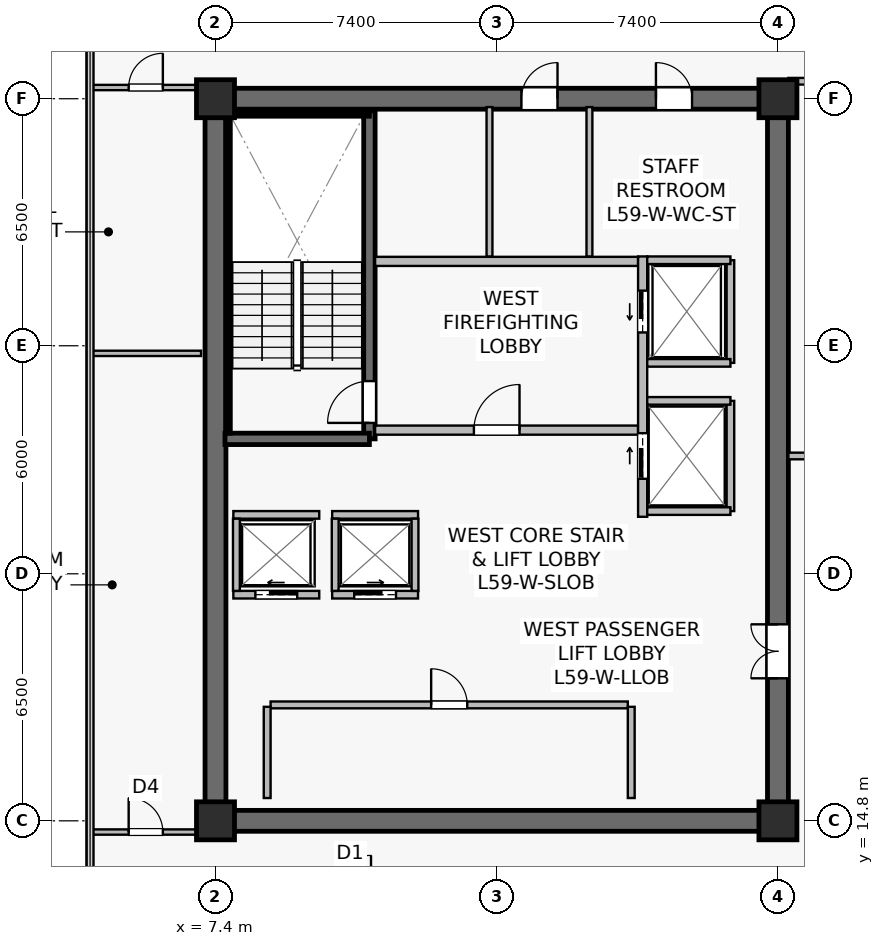
"""IFC4 building model, lengths in metres.
Left out: names, types, materials, properties, quantities, classifications, styles, units other than length and angle.
Written with IfcOpenShell. Run it as: python <this file> out.ifc"""

import sys

from ifc_helpers import new_model, si_unit, direction, frame, frame_2d, origin, origin_2d, place, context, subcontext, project, spatial, rectangle, extrude, source, transform, mapped, element, fill, save


model = new_model("IFC4")
c1 = context("Model", 3, precision=1e-05, world=origin(), true_north=direction((0.0, 1.0)))
c2 = subcontext(c1, "Body", "Model", "MODEL_VIEW")
j1 = project(units=[si_unit("LENGTHUNIT", "METRE"), si_unit("PLANEANGLEUNIT", "RADIAN")], contexts=[c1])
p1 = place(None, origin())
s1 = spatial("IfcSite", under=j1, at=p1, CompositionType="ELEMENT")
p2 = place(p1, origin())
s2 = spatial("IfcBuilding", under=s1, at=p2, CompositionType="ELEMENT")
p3 = place(p2, frame((0.0, 0.0, 246.5)))
s3 = spatial("IfcBuildingStorey", under=s2, at=p3, CompositionType="ELEMENT", Elevation=246.5)
p4 = place(p3, frame((7.125, 14.8, 0.0), z_axis=(0.0, 0.0, 1.0), x_axis=(1.0, 0.0, 0.0)))
e1 = element("IfcWall", 1, at=p4, inside=s3, PredefinedType="SHEAR", context=c2, shape_type="SweptSolid", body=[
    extrude(rectangle(XDim=15.35, YDim=0.55, at=frame_2d((7.675, 0.0))), origin(), (0.0, 0.0, 1.0), 3.8),
])
p5 = place(p3, frame((7.125, 33.8, 0.0), z_axis=(0.0, 0.0, 1.0), x_axis=(1.0, 0.0, 0.0)))
e2 = element("IfcWall", 2, at=p5, inside=s3, PredefinedType="SHEAR", context=c2, shape_type="SweptSolid", body=[
    extrude(rectangle(XDim=15.35, YDim=0.55, at=frame_2d((7.675, 0.0))), origin(), (0.0, 0.0, 1.0), 3.8),
])
p6 = place(p5, frame((8.325, 0.0, 0.0)))
e3 = element("IfcOpeningElement", 3, at=p6, cuts=e2, PredefinedType="OPENING", context=c2, shape_type="SweptSolid", body=[
    extrude(rectangle(XDim=0.95, YDim=2.15, at=frame_2d((0.475, 1.075))), frame((0.0, 0.285, 0.0), z_axis=(0.0, -1.0, 0.0), x_axis=(1.0, 0.0, 0.0)), (0.0, 0.0, 1.0), 0.57),
])
p7 = place(p5, frame((11.865, 0.0, 0.0)))
e4 = element("IfcOpeningElement", 4, at=p7, cuts=e2, PredefinedType="OPENING", context=c2, shape_type="SweptSolid", body=[
    extrude(rectangle(XDim=0.95, YDim=2.15, at=frame_2d((0.475, 1.075))), frame((0.0, 0.285, 0.0), z_axis=(0.0, -1.0, 0.0), x_axis=(1.0, 0.0, 0.0)), (0.0, 0.0, 1.0), 0.57),
])
p8 = place(p3, frame((7.4, 15.075, 0.0), z_axis=(0.0, 0.0, 1.0), x_axis=(0.0, 1.0, 0.0)))
e5 = element("IfcWall", 5, at=p8, inside=s3, PredefinedType="SHEAR", context=c2, shape_type="SweptSolid", body=[
    extrude(rectangle(XDim=18.45, YDim=0.55, at=frame_2d((9.225, 0.0))), origin(), (0.0, 0.0, 1.0), 3.8),
])
p9 = place(p3, frame((22.2, 15.075, 0.0), z_axis=(0.0, 0.0, 1.0), x_axis=(0.0, 1.0, 0.0)))
e6 = element("IfcWall", 6, at=p9, inside=s3, PredefinedType="SHEAR", context=c2, shape_type="SweptSolid", body=[
    extrude(rectangle(XDim=18.45, YDim=0.55, at=frame_2d((9.225, 0.0))), origin(), (0.0, 0.0, 1.0), 3.8),
])
p10 = place(p9, frame((3.475, 0.0, 0.0)))
e7 = element("IfcOpeningElement", 7, at=p10, cuts=e6, PredefinedType="OPENING", context=c2, shape_type="SweptSolid", body=[
    extrude(rectangle(XDim=1.42, YDim=2.2, at=frame_2d((0.71, 1.1))), frame((0.0, 0.285, 0.0), z_axis=(0.0, -1.0, 0.0), x_axis=(1.0, 0.0, 0.0)), (0.0, 0.0, 1.0), 0.57),
])
p11 = place(p3, frame((11.45, 24.85, 0.0), z_axis=(0.0, 0.0, 1.0), x_axis=(0.0, 1.0, 0.0)))
e8 = element("IfcWall", 8, at=p11, inside=s3, PredefinedType="SHEAR", context=c2, shape_type="SweptSolid", body=[
    extrude(rectangle(XDim=8.63, YDim=0.3, at=frame_2d((4.315, 0.0))), origin(), (0.0, 0.0, 1.0), 3.8),
])
p12 = place(p11, frame((0.42, 0.0, 0.0)))
e9 = element("IfcOpeningElement", 9, at=p12, cuts=e8, PredefinedType="OPENING", context=c2, shape_type="SweptSolid", body=[
    extrude(rectangle(XDim=1.1, YDim=2.15, at=frame_2d((0.55, 1.075))), frame((0.0, 0.16, 0.0), z_axis=(0.0, -1.0, 0.0), x_axis=(1.0, 0.0, 0.0)), (0.0, 0.0, 1.0), 0.32),
])
p13 = place(p3, frame((7.65, 24.85, 0.0), z_axis=(0.0, 0.0, 1.0), x_axis=(1.0, 0.0, 0.0)))
e10 = element("IfcWall", 10, at=p13, inside=s3, PredefinedType="SHEAR", context=c2, shape_type="SweptSolid", body=[
    extrude(rectangle(XDim=3.8, YDim=0.3, at=frame_2d((1.9, 0.0))), origin(), (0.0, 0.0, 1.0), 3.8),
])
p14 = place(p3, frame((7.73, 33.4, 0.0), z_axis=(0.0, 0.0, 1.0), x_axis=(1.0, 0.0, 0.0)))
e11 = element("IfcWall", 11, at=p14, inside=s3, PredefinedType="SOLIDWALL", context=c2, shape_type="SweptSolid", body=[
    extrude(rectangle(XDim=3.72, YDim=0.12, at=frame_2d((1.86, 0.0))), origin(), (0.0, 0.0, 1.0), 3.8),
])
p15 = place(p3, frame((7.73, 25.0, 0.0), z_axis=(0.0, 0.0, 1.0), x_axis=(0.0, 1.0, 0.0)))
e12 = element("IfcWall", 12, at=p15, inside=s3, PredefinedType="SOLIDWALL", context=c2, shape_type="SweptSolid", body=[
    extrude(rectangle(XDim=8.32, YDim=0.12, at=frame_2d((4.16, 0.0))), origin(), (0.0, 0.0, 1.0), 3.8),
])
m1 = source(origin(), c2, "Body", "SweptSolid", [
    extrude(rectangle(XDim=1.0, YDim=1.0, at=origin_2d()), origin(), (0.0, 0.0, 1.0), 4.1),
])
for number, where, z_axis, x_axis in (
    (13, (7.4, 14.8, 0.0), (0.0, 0.0, 1.0), (1.0, 0.0, 0.0)),
    (14, (22.2, 14.8, 0.0), (0.0, 0.0, 1.0), (1.0, 0.0, 0.0)),
    (15, (7.4, 33.8, 0.0), (0.0, 0.0, 1.0), (1.0, 0.0, 0.0)),
    (16, (22.2, 33.8, 0.0), (0.0, 0.0, 1.0), (1.0, 0.0, 0.0)),
):
    element("IfcColumn", number, at=place(p3, frame(where, z_axis=z_axis, x_axis=x_axis)), inside=s3, PredefinedType="COLUMN", context=c2, shape_type="MappedRepresentation", body=[
        mapped(m1, transform((0.0, 0.0, 0.0), scale=1.0)),
    ])
p16 = place(p3, frame((11.6, 25.08, 0.0), z_axis=(0.0, 0.0, 1.0), x_axis=(1.0, 0.0, 0.0)))
e17 = element("IfcWall", 17, at=p16, inside=s3, PredefinedType="SOLIDWALL", context=c2, shape_type="SweptSolid", body=[
    extrude(rectangle(XDim=6.92, YDim=0.24, at=frame_2d((3.46, 0.0))), origin(), (0.0, 0.0, 1.0), 3.197),
])
p17 = place(p16, frame((2.6, 0.0, 0.0)))
e18 = element("IfcOpeningElement", 18, at=p17, cuts=e17, PredefinedType="OPENING", context=c2, shape_type="SweptSolid", body=[
    extrude(rectangle(XDim=1.2, YDim=2.16, at=frame_2d((0.6, 1.08))), frame((0.0, 0.13, 0.0), z_axis=(0.0, -1.0, 0.0), x_axis=(1.0, 0.0, 0.0)), (0.0, 0.0, 1.0), 0.26),
])
p18 = place(p3, frame((11.6, 29.52, 0.0), z_axis=(0.0, 0.0, 1.0), x_axis=(1.0, 0.0, 0.0)))
e19 = element("IfcWall", 19, at=p18, inside=s3, PredefinedType="SOLIDWALL", context=c2, shape_type="SweptSolid", body=[
    extrude(rectangle(XDim=6.92, YDim=0.24, at=frame_2d((3.46, 0.0))), origin(), (0.0, 0.0, 1.0), 3.197),
])
p19 = place(p3, frame((18.64, 22.8, 0.0), z_axis=(0.0, 0.0, 1.0), x_axis=(0.0, 1.0, 0.0)))
e20 = element("IfcWall", 20, at=p19, inside=s3, PredefinedType="SOLIDWALL", context=c2, shape_type="SweptSolid", body=[
    extrude(rectangle(XDim=6.85, YDim=0.24, at=frame_2d((3.425, 0.0))), origin(), (0.0, 0.0, 1.0), 2.935),
])
p20 = place(p19, frame((4.85, 0.0, 0.0)))
e21 = element("IfcOpeningElement", 21, at=p20, cuts=e20, PredefinedType="OPENING", context=c2, shape_type="SweptSolid", body=[
    extrude(rectangle(XDim=1.1, YDim=2.22, at=frame_2d((0.55, 1.11))), frame((0.0, 0.13, 0.0), z_axis=(0.0, -1.0, 0.0), x_axis=(1.0, 0.0, 0.0)), (0.0, 0.0, 1.0), 0.26),
])
p21 = place(p19, frame((1.0, 0.0, 0.0)))
e22 = element("IfcOpeningElement", 22, at=p21, cuts=e20, PredefinedType="OPENING", context=c2, shape_type="SweptSolid", body=[
    extrude(rectangle(XDim=1.2, YDim=2.22, at=frame_2d((0.6, 1.11))), frame((0.0, 0.13, 0.0), z_axis=(0.0, -1.0, 0.0), x_axis=(1.0, 0.0, 0.0)), (0.0, 0.0, 1.0), 0.26),
])
p22 = place(p3, frame((7.87, 20.75, 0.0), z_axis=(0.0, 0.0, 1.0), x_axis=(1.0, 0.0, 0.0)))
e23 = element("IfcWall", 23, at=p22, inside=s3, PredefinedType="SOLIDWALL", context=c2, shape_type="SweptSolid", body=[
    extrude(rectangle(XDim=2.26, YDim=0.2, at=frame_2d((1.13, 0.0))), origin(), (0.0, 0.0, 1.0), 3.8),
])
p23 = place(p22, frame((0.58, 0.0, 0.0)))
e24 = element("IfcOpeningElement", 24, at=p23, cuts=e23, PredefinedType="OPENING", context=c2, shape_type="SweptSolid", body=[
    extrude(rectangle(XDim=1.1, YDim=2.22, at=frame_2d((0.55, 1.11))), frame((0.0, 0.11, 0.0), z_axis=(0.0, -1.0, 0.0), x_axis=(1.0, 0.0, 0.0)), (0.0, 0.0, 1.0), 0.22),
])
p24 = place(p3, frame((7.87, 22.85, 0.0), z_axis=(0.0, 0.0, 1.0), x_axis=(1.0, 0.0, 0.0)))
e25 = element("IfcWall", 25, at=p24, inside=s3, PredefinedType="SOLIDWALL", context=c2, shape_type="SweptSolid", body=[
    extrude(rectangle(XDim=2.26, YDim=0.2, at=frame_2d((1.13, 0.0))), origin(), (0.0, 0.0, 1.0), 3.8),
])
p25 = place(p3, frame((7.95, 20.85, 0.0), z_axis=(0.0, 0.0, 1.0), x_axis=(0.0, 1.0, 0.0)))
e26 = element("IfcWall", 26, at=p25, inside=s3, PredefinedType="SOLIDWALL", context=c2, shape_type="SweptSolid", body=[
    extrude(rectangle(XDim=1.9, YDim=0.18, at=frame_2d((0.95, 0.0))), origin(), (0.0, 0.0, 1.0), 3.8),
])
p26 = place(p3, frame((10.47, 20.75, 0.0), z_axis=(0.0, 0.0, 1.0), x_axis=(1.0, 0.0, 0.0)))
e27 = element("IfcWall", 27, at=p26, inside=s3, PredefinedType="SOLIDWALL", context=c2, shape_type="SweptSolid", body=[
    extrude(rectangle(XDim=2.26, YDim=0.2, at=frame_2d((1.13, 0.0))), origin(), (0.0, 0.0, 1.0), 3.8),
])
p27 = place(p26, frame((0.58, 0.0, 0.0)))
e28 = element("IfcOpeningElement", 28, at=p27, cuts=e27, PredefinedType="OPENING", context=c2, shape_type="SweptSolid", body=[
    extrude(rectangle(XDim=1.1, YDim=2.22, at=frame_2d((0.55, 1.11))), frame((0.0, 0.11, 0.0), z_axis=(0.0, -1.0, 0.0), x_axis=(1.0, 0.0, 0.0)), (0.0, 0.0, 1.0), 0.22),
])
p28 = place(p3, frame((10.47, 22.85, 0.0), z_axis=(0.0, 0.0, 1.0), x_axis=(1.0, 0.0, 0.0)))
e29 = element("IfcWall", 29, at=p28, inside=s3, PredefinedType="SOLIDWALL", context=c2, shape_type="SweptSolid", body=[
    extrude(rectangle(XDim=2.26, YDim=0.2, at=frame_2d((1.13, 0.0))), origin(), (0.0, 0.0, 1.0), 3.8),
])
for number, where, z_axis, x_axis in (
    (30, (10.55, 20.85, 0.0), (0.0, 0.0, 1.0), (0.0, 1.0, 0.0)),
    (31, (12.65, 20.85, 0.0), (0.0, 0.0, 1.0), (0.0, 1.0, 0.0)),
):
    element("IfcWall", number, at=place(p3, frame(where, z_axis=z_axis, x_axis=x_axis)), inside=s3, PredefinedType="SOLIDWALL", context=c2, shape_type="SweptSolid", body=[
        extrude(rectangle(XDim=1.9, YDim=0.18, at=frame_2d((0.95, 0.0))), origin(), (0.0, 0.0, 1.0), 3.8),
    ])
p29 = place(p3, frame((20.95, 26.85, 0.0), z_axis=(0.0, 0.0, 1.0), x_axis=(0.0, 1.0, 0.0)))
e32 = element("IfcWall", 32, at=p29, inside=s3, PredefinedType="SOLIDWALL", context=c2, shape_type="SweptSolid", body=[
    extrude(rectangle(XDim=2.7, YDim=0.2, at=frame_2d((1.35, 0.0))), origin(), (0.0, 0.0, 1.0), 3.8),
])
p30 = place(p3, frame((18.76, 29.55, 0.0), z_axis=(0.0, 0.0, 1.0), x_axis=(1.0, 0.0, 0.0)))
e33 = element("IfcWall", 33, at=p30, inside=s3, PredefinedType="SOLIDWALL", context=c2, shape_type="SweptSolid", body=[
    extrude(rectangle(XDim=2.19, YDim=0.2, at=frame_2d((1.095, 0.0))), origin(), (0.0, 0.0, 1.0), 3.8),
])
p31 = place(p3, frame((18.76, 26.85, 0.0), z_axis=(0.0, 0.0, 1.0), x_axis=(1.0, 0.0, 0.0)))
e34 = element("IfcWall", 34, at=p31, inside=s3, PredefinedType="SOLIDWALL", context=c2, shape_type="SweptSolid", body=[
    extrude(rectangle(XDim=2.19, YDim=0.2, at=frame_2d((1.095, 0.0))), origin(), (0.0, 0.0, 1.0), 3.197),
])
p32 = place(p3, frame((20.95, 22.95, 0.0), z_axis=(0.0, 0.0, 1.0), x_axis=(0.0, 1.0, 0.0)))
e35 = element("IfcWall", 35, at=p32, inside=s3, PredefinedType="SOLIDWALL", context=c2, shape_type="SweptSolid", body=[
    extrude(rectangle(XDim=2.9, YDim=0.2, at=frame_2d((1.45, 0.0))), origin(), (0.0, 0.0, 1.0), 2.935),
])
for number, where, z_axis, x_axis in (
    (36, (18.76, 25.85, 0.0), (0.0, 0.0, 1.0), (1.0, 0.0, 0.0)),
    (37, (18.76, 22.95, 0.0), (0.0, 0.0, 1.0), (1.0, 0.0, 0.0)),
):
    element("IfcWall", number, at=place(p3, frame(where, z_axis=z_axis, x_axis=x_axis)), inside=s3, PredefinedType="SOLIDWALL", context=c2, shape_type="SweptSolid", body=[
        extrude(rectangle(XDim=2.19, YDim=0.2, at=frame_2d((1.095, 0.0))), origin(), (0.0, 0.0, 1.0), 3.8),
    ])
p33 = place(p3, frame((8.85, 17.85, 0.0), z_axis=(0.0, 0.0, 1.0), x_axis=(1.0, 0.0, 0.0)))
e38 = element("IfcWall", 38, at=p33, inside=s3, PredefinedType="SOLIDWALL", context=c2, shape_type="SweptSolid", body=[
    extrude(rectangle(XDim=9.4, YDim=0.18, at=frame_2d((4.7, 0.0))), origin(), (0.0, 0.0, 1.0), 3.197),
])
p34 = place(p33, frame((4.225, 0.0, 0.0)))
e39 = element("IfcOpeningElement", 39, at=p34, cuts=e38, PredefinedType="OPENING", context=c2, shape_type="SweptSolid", body=[
    extrude(rectangle(XDim=0.95, YDim=2.15, at=frame_2d((0.475, 1.075))), frame((0.0, 0.1, 0.0), z_axis=(0.0, -1.0, 0.0), x_axis=(1.0, 0.0, 0.0)), (0.0, 0.0, 1.0), 0.2),
])
for number, where, z_axis, x_axis in (
    (40, (18.34, 15.4, 0.0), (0.0, 0.0, 1.0), (0.0, 1.0, 0.0)),
    (41, (8.76, 15.4, 0.0), (0.0, 0.0, 1.0), (0.0, 1.0, 0.0)),
):
    element("IfcWall", number, at=place(p3, frame(where, z_axis=z_axis, x_axis=x_axis)), inside=s3, PredefinedType="SOLIDWALL", context=c2, shape_type="SweptSolid", body=[
        extrude(rectangle(XDim=2.4, YDim=0.18, at=frame_2d((1.2, 0.0))), origin(), (0.0, 0.0, 1.0), 3.8),
    ])
p35 = place(p3, frame((14.61, 29.65, 0.0), z_axis=(0.0, 0.0, 1.0), x_axis=(0.0, 1.0, 0.0)))
e42 = element("IfcWall", 42, at=p35, inside=s3, PredefinedType="PLUMBINGWALL", context=c2, shape_type="SweptSolid", body=[
    extrude(rectangle(XDim=3.93, YDim=0.155, at=frame_2d((1.965, 0.0))), origin(), (0.0, 0.0, 1.0), 3.197),
])
p36 = place(p3, frame((17.24, 29.65, 0.0), z_axis=(0.0, 0.0, 1.0), x_axis=(0.0, 1.0, 0.0)))
e43 = element("IfcWall", 43, at=p36, inside=s3, PredefinedType="PLUMBINGWALL", context=c2, shape_type="SweptSolid", body=[
    extrude(rectangle(XDim=3.93, YDim=0.155, at=frame_2d((1.965, 0.0))), origin(), (0.0, 0.0, 1.0), 3.8),
])
p37 = place(p3, frame((22.475, 34.26, 0.0), z_axis=(0.0, 0.0, 1.0), x_axis=(1.0, 0.0, 0.0)))
e44 = element("IfcWall", 44, at=p37, inside=s3, PredefinedType="PARTITIONING", context=c2, shape_type="SweptSolid", body=[
    extrude(rectangle(XDim=4.025, YDim=0.175, at=frame_2d((2.012, 0.0))), origin(), (0.0, 0.0, 1.0), 3.535),
])
p38 = place(p3, frame((22.475, 24.4, 0.0), z_axis=(0.0, 0.0, 1.0), x_axis=(1.0, 0.0, 0.0)))
e45 = element("IfcWall", 45, at=p38, inside=s3, PredefinedType="PARTITIONING", context=c2, shape_type="SweptSolid", body=[
    extrude(rectangle(XDim=4.025, YDim=0.175, at=frame_2d((2.012, 0.0))), origin(), (0.0, 0.0, 1.0), 3.8),
])
p39 = place(p38, frame((1.35, 0.0, 0.0)))
e46 = element("IfcOpeningElement", 46, at=p39, cuts=e45, PredefinedType="OPENING", context=c2, shape_type="SweptSolid", body=[
    extrude(rectangle(XDim=0.95, YDim=2.15, at=frame_2d((0.475, 1.075))), frame((0.0, 0.098, 0.0), z_axis=(0.0, -1.0, 0.0), x_axis=(1.0, 0.0, 0.0)), (0.0, 0.0, 1.0), 0.195),
])
p40 = place(p3, frame((4.11, 27.1, 0.0), z_axis=(0.0, 0.0, 1.0), x_axis=(1.0, 0.0, 0.0)))
e47 = element("IfcWall", 47, at=p40, inside=s3, PredefinedType="PARTITIONING", context=c2, shape_type="SweptSolid", body=[
    extrude(rectangle(XDim=2.91, YDim=0.14, at=frame_2d((1.455, 0.0))), origin(), (0.0, 0.0, 1.0), 3.8),
])
p41 = place(p3, frame((4.11, 14.505, 0.0), z_axis=(0.0, 0.0, 1.0), x_axis=(1.0, 0.0, 0.0)))
e48 = element("IfcWall", 48, at=p41, inside=s3, PredefinedType="PARTITIONING", context=c2, shape_type="SweptSolid", body=[
    extrude(rectangle(XDim=2.91, YDim=0.14, at=frame_2d((1.455, 0.0))), origin(), (0.0, 0.0, 1.0), 3.8),
])
p42 = place(p41, frame((1.005, 0.0, 0.0)))
e49 = element("IfcOpeningElement", 49, at=p42, cuts=e48, PredefinedType="OPENING", context=c2, shape_type="SweptSolid", body=[
    extrude(rectangle(XDim=0.9, YDim=2.1, at=frame_2d((0.45, 1.05))), frame((0.0, 0.08, 0.0), z_axis=(0.0, -1.0, 0.0), x_axis=(1.0, 0.0, 0.0)), (0.0, 0.0, 1.0), 0.16),
])
p43 = place(p3, frame((4.11, 34.095, 0.0), z_axis=(0.0, 0.0, 1.0), x_axis=(1.0, 0.0, 0.0)))
e50 = element("IfcWall", 50, at=p43, inside=s3, PredefinedType="PARTITIONING", context=c2, shape_type="SweptSolid", body=[
    extrude(rectangle(XDim=2.91, YDim=0.14, at=frame_2d((1.455, 0.0))), origin(), (0.0, 0.0, 1.0), 3.8),
])
p44 = place(p43, frame((1.005, 0.0, 0.0)))
e51 = element("IfcOpeningElement", 51, at=p44, cuts=e50, PredefinedType="OPENING", context=c2, shape_type="SweptSolid", body=[
    extrude(rectangle(XDim=0.9, YDim=2.1, at=frame_2d((0.45, 1.05))), frame((0.0, 0.08, 0.0), z_axis=(0.0, -1.0, 0.0), x_axis=(1.0, 0.0, 0.0)), (0.0, 0.0, 1.0), 0.16),
])
m2 = source(origin(), c2, "Body", "SweptSolid", [
    extrude(rectangle(XDim=1.1, YDim=2.15, at=frame_2d((0.55, 1.075))), frame((0.0, 0.025, 0.0), z_axis=(0.0, -1.0, 0.0), x_axis=(1.0, 0.0, 0.0)), (0.0, 0.0, 1.0), 0.05),
])
p45 = place(p12, origin())
e52 = element("IfcDoor", 52, at=p45, inside=s3, OperationType="SINGLE_SWING_LEFT", PredefinedType="DOOR", context=c2, shape_type="MappedRepresentation", body=[
    mapped(m2, transform((0.0, 0.0, 0.0), scale=1.0)),
])
fill(e9, e52)
m3 = source(origin(), c2, "Body", "SweptSolid", [
    extrude(rectangle(XDim=1.2, YDim=2.16, at=frame_2d((0.6, 1.08))), frame((0.0, 0.025, 0.0), z_axis=(0.0, -1.0, 0.0), x_axis=(1.0, 0.0, 0.0)), (0.0, 0.0, 1.0), 0.05),
])
p46 = place(p17, origin())
e53 = element("IfcDoor", 53, at=p46, inside=s3, OperationType="SINGLE_SWING_RIGHT", PredefinedType="DOOR", context=c2, shape_type="MappedRepresentation", body=[
    mapped(m3, transform((0.0, 0.0, 0.0), scale=1.0)),
])
fill(e18, e53)
m4 = source(origin(), c2, "Body", "SweptSolid", [
    extrude(rectangle(XDim=1.1, YDim=2.22, at=frame_2d((0.55, 1.11))), frame((0.0, 0.025, 0.0), z_axis=(0.0, -1.0, 0.0), x_axis=(1.0, 0.0, 0.0)), (0.0, 0.0, 1.0), 0.05),
])
p47 = place(p23, origin())
e54 = element("IfcDoor", 54, at=p47, inside=s3, OperationType="SLIDING_TO_LEFT", PredefinedType="USERDEFINED", context=c2, shape_type="MappedRepresentation", body=[
    mapped(m4, transform((0.0, 0.0, 0.0), scale=1.0)),
])
fill(e24, e54)
p48 = place(p27, origin())
e55 = element("IfcDoor", 55, at=p48, inside=s3, OperationType="SLIDING_TO_RIGHT", PredefinedType="USERDEFINED", context=c2, shape_type="MappedRepresentation", body=[
    mapped(m4, transform((0.0, 0.0, 0.0), scale=1.0)),
])
fill(e28, e55)
p49 = place(p20, origin())
e56 = element("IfcDoor", 56, at=p49, inside=s3, OperationType="SLIDING_TO_LEFT", PredefinedType="USERDEFINED", context=c2, shape_type="MappedRepresentation", body=[
    mapped(m4, transform((0.0, 0.0, 0.0), scale=1.0)),
])
fill(e21, e56)
m5 = source(origin(), c2, "Body", "SweptSolid", [
    extrude(rectangle(XDim=1.2, YDim=2.22, at=frame_2d((0.6, 1.11))), frame((0.0, 0.025, 0.0), z_axis=(0.0, -1.0, 0.0), x_axis=(1.0, 0.0, 0.0)), (0.0, 0.0, 1.0), 0.05),
])
p50 = place(p21, origin())
e57 = element("IfcDoor", 57, at=p50, inside=s3, OperationType="SLIDING_TO_RIGHT", PredefinedType="USERDEFINED", context=c2, shape_type="MappedRepresentation", body=[
    mapped(m5, transform((0.0, 0.0, 0.0), scale=1.0)),
])
fill(e22, e57)
m6 = source(origin(), c2, "Body", "SweptSolid", [
    extrude(rectangle(XDim=0.95, YDim=2.15, at=frame_2d((0.475, 1.075))), frame((0.0, 0.025, 0.0), z_axis=(0.0, -1.0, 0.0), x_axis=(1.0, 0.0, 0.0)), (0.0, 0.0, 1.0), 0.05),
])
p51 = place(p34, origin())
e58 = element("IfcDoor", 58, at=p51, inside=s3, OperationType="SINGLE_SWING_LEFT", PredefinedType="DOOR", context=c2, shape_type="MappedRepresentation", body=[
    mapped(m6, transform((0.0, 0.0, 0.0), scale=1.0)),
])
fill(e39, e58)
m7 = source(origin(), c2, "Body", "SweptSolid", [
    extrude(rectangle(XDim=1.42, YDim=2.2, at=frame_2d((0.71, 1.1))), frame((0.0, 0.025, 0.0), z_axis=(0.0, -1.0, 0.0), x_axis=(1.0, 0.0, 0.0)), (0.0, 0.0, 1.0), 0.05),
])
p52 = place(p10, origin())
e59 = element("IfcDoor", 59, at=p52, inside=s3, OperationType="DOUBLE_DOOR_SINGLE_SWING", PredefinedType="DOOR", context=c2, shape_type="MappedRepresentation", body=[
    mapped(m7, transform((0.0, 0.0, 0.0), scale=1.0)),
])
fill(e7, e59)
p53 = place(p6, origin())
e60 = element("IfcDoor", 60, at=p53, inside=s3, OperationType="SINGLE_SWING_RIGHT", PredefinedType="DOOR", context=c2, shape_type="MappedRepresentation", body=[
    mapped(m6, transform((0.0, 0.0, 0.0), scale=1.0)),
])
fill(e3, e60)
p54 = place(p7, origin())
e61 = element("IfcDoor", 61, at=p54, inside=s3, OperationType="SINGLE_SWING_LEFT", PredefinedType="DOOR", context=c2, shape_type="MappedRepresentation", body=[
    mapped(m6, transform((0.0, 0.0, 0.0), scale=1.0)),
])
fill(e4, e61)
m8 = source(origin(), c2, "Body", "SweptSolid", [
    extrude(rectangle(XDim=0.9, YDim=2.1, at=frame_2d((0.45, 1.05))), frame((0.0, 0.025, 0.0), z_axis=(0.0, -1.0, 0.0), x_axis=(1.0, 0.0, 0.0)), (0.0, 0.0, 1.0), 0.05),
])
p55 = place(p42, origin())
e62 = element("IfcDoor", 62, at=p55, inside=s3, OperationType="SINGLE_SWING_LEFT", PredefinedType="DOOR", context=c2, shape_type="MappedRepresentation", body=[
    mapped(m8, transform((0.0, 0.0, 0.0), scale=1.0)),
])
fill(e49, e62)
p56 = place(p44, origin())
e63 = element("IfcDoor", 63, at=p56, inside=s3, OperationType="SINGLE_SWING_RIGHT", PredefinedType="DOOR", context=c2, shape_type="MappedRepresentation", body=[
    mapped(m8, transform((0.0, 0.0, 0.0), scale=1.0)),
])
fill(e51, e63)
save(model, sys.argv[1])
